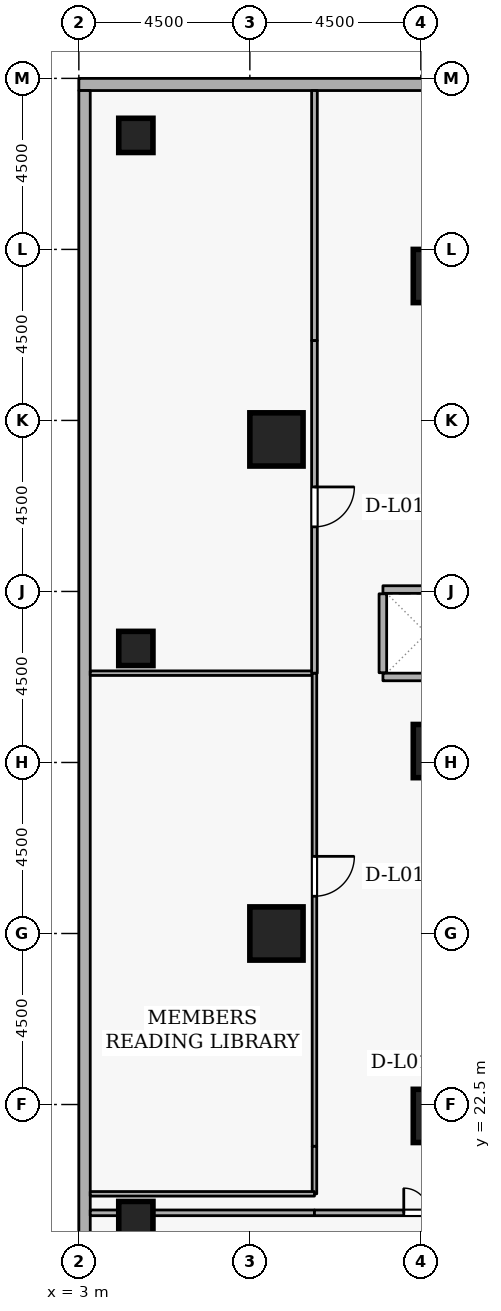
"""IFC4 building model, lengths in metres.
Left out: names, types, materials, properties, quantities, classifications, styles, units other than length and angle.
Written with IfcOpenShell. Run it as: python <this file> out.ifc"""

import sys

from ifc_helpers import new_model, si_unit, direction, frame, frame_2d, origin, origin_2d, place, context, subcontext, project, spatial, rectangle, extrude, element, fill, save


model = new_model("IFC4")
c1 = context("Model", 3, precision=1e-05, world=origin(), true_north=direction((0.0, 1.0)))
c2 = subcontext(c1, "Body", "Model", "MODEL_VIEW")
j1 = project(units=[si_unit("LENGTHUNIT", "METRE"), si_unit("PLANEANGLEUNIT", "RADIAN")], contexts=[c1])
p1 = place(None, origin())
s1 = spatial("IfcSite", under=j1, at=p1, CompositionType="ELEMENT")
p2 = place(p1, origin())
s2 = spatial("IfcBuilding", under=s1, at=p2, CompositionType="ELEMENT")
p3 = place(p2, frame((0.0, 0.0, 4.8)))
s3 = spatial("IfcBuildingStorey", under=s2, at=p3, CompositionType="ELEMENT", Elevation=4.8)
for number, where, z_axis, x_axis in (
    (1, (12.5, 44.3, 0.0), (0.0, 0.0, 1.0), (1.0, 0.0, 0.0)),
    (2, (8.2, 27.0, 0.0), (0.0, 0.0, 1.0), (1.0, 0.0, 0.0)),
    (3, (8.2, 40.0, 0.0), (0.0, 0.0, 1.0), (1.0, 0.0, 0.0)),
    (4, (12.5, 22.2, 0.0), (0.0, 0.0, 1.0), (1.0, 0.0, 0.0)),
    (5, (12.5, 31.8, 0.0), (0.0, 0.0, 1.0), (1.0, 0.0, 0.0)),
):
    element("IfcColumn", number, at=place(p3, frame(where, z_axis=z_axis, x_axis=x_axis)), inside=s3, PredefinedType="COLUMN", context=c2, shape_type="SweptSolid", body=[
        extrude(rectangle(XDim=1.4, YDim=1.4, at=origin_2d()), origin(), (0.0, 0.0, 1.0), 4.8),
    ])
for number, where, z_axis, x_axis in (
    (6, (4.5, 19.5, 0.0), (0.0, 0.0, 1.0), (1.0, 0.0, 0.0)),
    (7, (4.5, 34.5, 0.0), (0.0, 0.0, 1.0), (1.0, 0.0, 0.0)),
    (8, (4.5, 48.0, 0.0), (0.0, 0.0, 1.0), (1.0, 0.0, 0.0)),
):
    element("IfcColumn", number, at=place(p3, frame(where, z_axis=z_axis, x_axis=x_axis)), inside=s3, PredefinedType="COLUMN", context=c2, shape_type="SweptSolid", body=[
        extrude(rectangle(XDim=0.9, YDim=0.9, at=origin_2d()), origin(), (0.0, 0.0, 1.0), 4.8),
    ])
p4 = place(p3, frame((42.4, 49.34, 0.0), z_axis=(0.0, 0.0, 1.0), x_axis=(-1.0, 0.0, 0.0)))
e9 = element("IfcWall", 9, at=p4, inside=s3, PredefinedType="STANDARD", context=c2, shape_type="SweptSolid", body=[
    extrude(rectangle(XDim=39.4, YDim=0.32, at=frame_2d((19.7, 0.0))), origin(), (0.0, 0.0, 1.0), 3.86),
])
p5 = place(p4, frame((12.8, 0.0, 0.78)))
e10 = element("IfcOpeningElement", 10, at=p5, cuts=e9, PredefinedType="OPENING", context=c2, shape_type="SweptSolid", body=[
    extrude(rectangle(XDim=2.1, YDim=2.4, at=frame_2d((1.05, 1.2))), frame((0.0, 0.17, 0.0), z_axis=(0.0, -1.0, 0.0), x_axis=(1.0, 0.0, 0.0)), (0.0, 0.0, 1.0), 0.34),
])
p6 = place(p4, frame((22.8, 0.0, 0.78)))
e11 = element("IfcOpeningElement", 11, at=p6, cuts=e9, PredefinedType="OPENING", context=c2, shape_type="SweptSolid", body=[
    extrude(rectangle(XDim=2.1, YDim=2.4, at=frame_2d((1.05, 1.2))), frame((0.0, 0.17, 0.0), z_axis=(0.0, -1.0, 0.0), x_axis=(1.0, 0.0, 0.0)), (0.0, 0.0, 1.0), 0.34),
])
p7 = place(p3, frame((3.15, 49.18, 0.0), z_axis=(0.0, 0.0, 1.0), x_axis=(0.0, -1.0, 0.0)))
e12 = element("IfcWall", 12, at=p7, inside=s3, PredefinedType="STANDARD", context=c2, shape_type="SweptSolid", body=[
    extrude(rectangle(XDim=42.86, YDim=0.3, at=frame_2d((21.43, 0.0))), origin(), (0.0, 0.0, 1.0), 3.86),
])
for number, where, z_axis, x_axis in (
    (13, (11.002, 36.05, 0.0), (0.0, 0.0, 1.0), (1.0, 0.0, 0.0)),
    (14, (11.002, 33.75, 0.0), (0.0, 0.0, 1.0), (1.0, 0.0, 0.0)),
):
    element("IfcWall", number, at=place(p3, frame(where, z_axis=z_axis, x_axis=x_axis)), inside=s3, PredefinedType="STANDARD", context=c2, shape_type="SweptSolid", body=[
        extrude(rectangle(XDim=2.296, YDim=0.2, at=frame_2d((1.148, 0.0))), origin(), (0.0, 0.0, 1.0), 4.46),
    ])
p8 = place(p3, frame((11.0, 33.862, 0.0), z_axis=(0.0, 0.0, 1.0), x_axis=(0.0, 1.0, 0.0)))
e15 = element("IfcWall", 15, at=p8, inside=s3, PredefinedType="STANDARD", context=c2, shape_type="SweptSolid", body=[
    extrude(rectangle(XDim=2.076, YDim=0.2, at=frame_2d((1.038, 0.0))), origin(), (0.0, 0.0, 1.0), 4.46),
])
p9 = place(p3, frame((3.3, 19.65, 0.0), z_axis=(0.0, 0.0, 1.0), x_axis=(1.0, 0.0, 0.0)))
e16 = element("IfcWall", 16, at=p9, inside=s3, PredefinedType="PARTITIONING", context=c2, shape_type="SweptSolid", body=[
    extrude(rectangle(XDim=5.9, YDim=0.15, at=frame_2d((2.95, 0.0))), origin(), (0.0, 0.0, 1.0), 4.46),
])
p10 = place(p3, frame((9.2, 19.65, 0.0), z_axis=(0.0, 0.0, 1.0), x_axis=(1.0, 0.0, 0.0)))
e17 = element("IfcWall", 17, at=p10, inside=s3, PredefinedType="PARTITIONING", context=c2, shape_type="SweptSolid", body=[
    extrude(rectangle(XDim=6.0, YDim=0.15, at=frame_2d((3.0, 0.0))), origin(), (0.0, 0.0, 1.0), 4.46),
])
p11 = place(p10, frame((2.35, 0.0, 0.0)))
e18 = element("IfcOpeningElement", 18, at=p11, cuts=e17, PredefinedType="OPENING", context=c2, shape_type="SweptSolid", body=[
    extrude(rectangle(XDim=1.3, YDim=2.12, at=frame_2d((0.65, 1.06))), frame((0.0, 0.085, 0.0), z_axis=(0.0, -1.0, 0.0), x_axis=(1.0, 0.0, 0.0)), (0.0, 0.0, 1.0), 0.17),
])
p12 = place(p3, frame((3.3, 33.85, 0.0), z_axis=(0.0, 0.0, 1.0), x_axis=(1.0, 0.0, 0.0)))
e19 = element("IfcWall", 19, at=p12, inside=s3, PredefinedType="PARTITIONING", context=c2, shape_type="SweptSolid", body=[
    extrude(rectangle(XDim=5.9, YDim=0.12, at=frame_2d((2.95, 0.0))), origin(), (0.0, 0.0, 1.0), 4.46),
])
p13 = place(p3, frame((9.2, 33.85, 0.0), z_axis=(0.0, 0.0, 1.0), x_axis=(0.0, -1.0, 0.0)))
e20 = element("IfcWall", 20, at=p13, inside=s3, PredefinedType="PARTITIONING", context=c2, shape_type="SweptSolid", body=[
    extrude(rectangle(XDim=12.45, YDim=0.12, at=frame_2d((6.225, 0.0))), origin(), (0.0, 0.0, 1.0), 4.46),
])
p14 = place(p13, frame((4.82, 0.0, 0.0)))
e21 = element("IfcOpeningElement", 21, at=p14, cuts=e20, PredefinedType="OPENING", context=c2, shape_type="SweptSolid", body=[
    extrude(rectangle(XDim=1.05, YDim=2.1, at=frame_2d((0.525, 1.05))), frame((0.0, 0.07, 0.0), z_axis=(0.0, -1.0, 0.0), x_axis=(1.0, 0.0, 0.0)), (0.0, 0.0, 1.0), 0.14),
])
p15 = place(p3, frame((9.2, 21.4, 0.0), z_axis=(0.0, 0.0, 1.0), x_axis=(0.0, -1.0, 0.0)))
e22 = element("IfcWall", 22, at=p15, inside=s3, PredefinedType="PARTITIONING", context=c2, shape_type="SweptSolid", body=[
    extrude(rectangle(XDim=1.25, YDim=0.12, at=frame_2d((0.625, 0.0))), origin(), (0.0, 0.0, 1.0), 4.46),
])
p16 = place(p3, frame((9.2, 20.15, 0.0), z_axis=(0.0, 0.0, 1.0), x_axis=(-1.0, 0.0, 0.0)))
e23 = element("IfcWall", 23, at=p16, inside=s3, PredefinedType="PARTITIONING", context=c2, shape_type="SweptSolid", body=[
    extrude(rectangle(XDim=5.9, YDim=0.12, at=frame_2d((2.95, 0.0))), origin(), (0.0, 0.0, 1.0), 4.46),
])
p17 = place(p3, frame((9.2, 49.18, 0.0), z_axis=(0.0, 0.0, 1.0), x_axis=(0.0, -1.0, 0.0)))
e24 = element("IfcWall", 24, at=p17, inside=s3, PredefinedType="PARTITIONING", context=c2, shape_type="SweptSolid", body=[
    extrude(rectangle(XDim=6.58, YDim=0.15, at=frame_2d((3.29, 0.0))), origin(), (0.0, 0.0, 1.0), 4.46),
])
p18 = place(p3, frame((9.2, 42.6, 0.0), z_axis=(0.0, 0.0, 1.0), x_axis=(0.0, -1.0, 0.0)))
e25 = element("IfcWall", 25, at=p18, inside=s3, PredefinedType="PARTITIONING", context=c2, shape_type="SweptSolid", body=[
    extrude(rectangle(XDim=8.75, YDim=0.15, at=frame_2d((4.375, 0.0))), origin(), (0.0, 0.0, 1.0), 4.46),
])
p19 = place(p18, frame((3.85, 0.0, 0.0)))
e26 = element("IfcOpeningElement", 26, at=p19, cuts=e25, PredefinedType="OPENING", context=c2, shape_type="SweptSolid", body=[
    extrude(rectangle(XDim=1.05, YDim=2.1, at=frame_2d((0.525, 1.05))), frame((0.0, 0.085, 0.0), z_axis=(0.0, -1.0, 0.0), x_axis=(1.0, 0.0, 0.0)), (0.0, 0.0, 1.0), 0.17),
])
p20 = place(p11, origin())
e27 = element("IfcDoor", 27, at=p20, inside=s3, OperationType="DOUBLE_DOOR_SINGLE_SWING", PredefinedType="DOOR", context=c2, shape_type="SweptSolid", body=[
    extrude(rectangle(XDim=1.3, YDim=2.12, at=frame_2d((0.65, 1.06))), frame((0.0, 0.025, 0.0), z_axis=(0.0, -1.0, 0.0), x_axis=(1.0, 0.0, 0.0)), (0.0, 0.0, 1.0), 0.05),
])
fill(e18, e27)
p21 = place(p14, origin())
e28 = element("IfcDoor", 28, at=p21, inside=s3, OperationType="SINGLE_SWING_LEFT", PredefinedType="DOOR", context=c2, shape_type="SweptSolid", body=[
    extrude(rectangle(XDim=1.05, YDim=2.1, at=frame_2d((0.525, 1.05))), frame((0.0, 0.025, 0.0), z_axis=(0.0, -1.0, 0.0), x_axis=(1.0, 0.0, 0.0)), (0.0, 0.0, 1.0), 0.05),
])
fill(e21, e28)
p22 = place(p19, origin())
e29 = element("IfcDoor", 29, at=p22, inside=s3, OperationType="SINGLE_SWING_LEFT", PredefinedType="DOOR", context=c2, shape_type="SweptSolid", body=[
    extrude(rectangle(XDim=1.05, YDim=2.1, at=frame_2d((0.525, 1.05))), frame((0.0, 0.025, 0.0), z_axis=(0.0, -1.0, 0.0), x_axis=(1.0, 0.0, 0.0)), (0.0, 0.0, 1.0), 0.05),
])
fill(e26, e29)
save(model, sys.argv[1])
